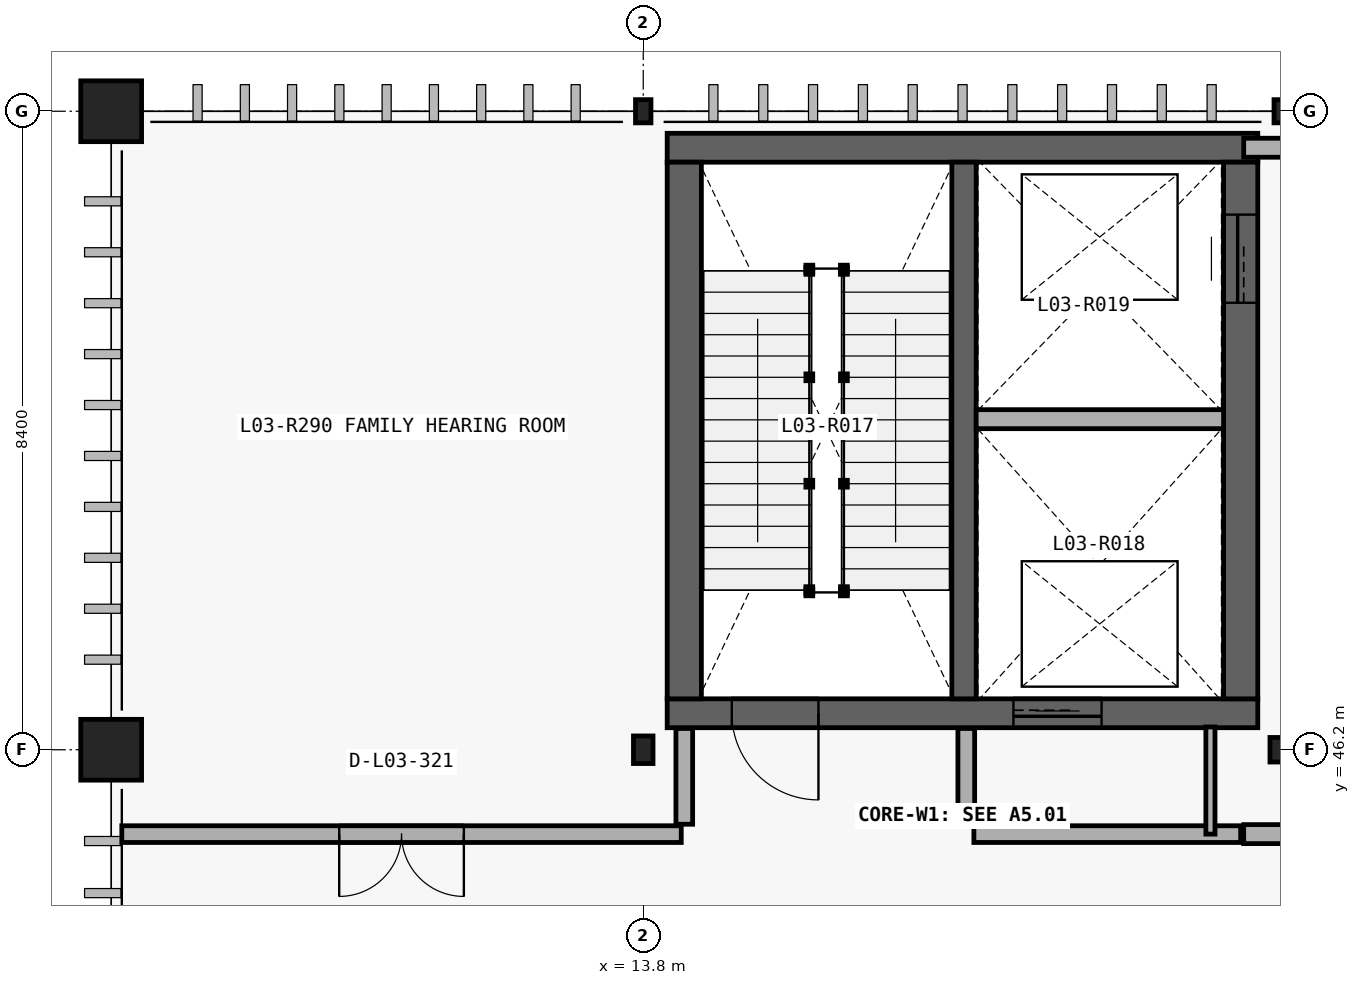
"""IFC4 building model, lengths in metres.
Left out: names, types, materials, properties, quantities, classifications, styles, units other than length and angle.
Written with IfcOpenShell. Run it as: python <this file> out.ifc"""

import sys

from ifc_helpers import new_model, si_unit, direction, frame, frame_2d, origin_with_axes, origin_2d_with_axis, place, context, subcontext, project, spatial, rectangle, hollow_rectangle, circle, i_section, extrude, element, fill, save


model = new_model("IFC4")
c1 = context("Model", 3, precision=1e-05, world=origin_with_axes(), true_north=direction((0.0, 1.0)))
c2 = subcontext(c1, "Body", "Model", "MODEL_VIEW")
j1 = project(units=[si_unit("LENGTHUNIT", "METRE"), si_unit("PLANEANGLEUNIT", "RADIAN")], contexts=[c1])
p1 = place(None, origin_with_axes())
s1 = spatial("IfcSite", under=j1, at=p1, CompositionType="ELEMENT")
p2 = place(p1, origin_with_axes())
s2 = spatial("IfcBuilding", under=s1, at=p2, CompositionType="ELEMENT")
p3 = place(p2, frame((0.0, 0.0, 15.6), z_axis=(0.0, 0.0, 1.0), x_axis=(1.0, 0.0, 0.0)))
s3 = spatial("IfcBuildingStorey", under=s2, at=p3, CompositionType="ELEMENT", Elevation=15.6)
p4 = place(None, frame((14.115, 46.68, 15.6), z_axis=(0.0, 0.0, 1.0), x_axis=(1.0, 0.0, 0.0)))
e1 = element("IfcWall", 1, at=p4, inside=s3, PredefinedType="SHEAR", context=c2, shape_type="SweptSolid", body=[
    extrude(rectangle(XDim=7.77, YDim=0.38, at=frame_2d((3.885, 0.0), x_axis=(1.0, 0.0))), origin_with_axes(), (0.0, 0.0, 1.0), 4.8),
])
p5 = place(None, frame((15.535, 46.68, 15.6), z_axis=(0.0, 0.0, 1.0), x_axis=(1.0, 0.0, 0.0)))
e2 = element("IfcOpeningElement", 2, at=p5, cuts=e1, PredefinedType="OPENING", context=c2, shape_type="SweptSolid", body=[
    extrude(rectangle(XDim=1.14, YDim=2.18, at=frame_2d((0.0, 1.09), x_axis=(1.0, 0.0))), frame((0.0, 0.2, 0.0), z_axis=(0.0, -1.0, 0.0), x_axis=(1.0, 0.0, 0.0)), (0.0, 0.0, 1.0), 0.4),
])
p6 = place(None, frame((19.25, 46.68, 15.6), z_axis=(0.0, 0.0, 1.0), x_axis=(1.0, 0.0, 0.0)))
e3 = element("IfcOpeningElement", 3, at=p6, cuts=e1, PredefinedType="OPENING", context=c2, shape_type="SweptSolid", body=[
    extrude(rectangle(XDim=1.16, YDim=2.2, at=frame_2d((0.0, 1.1), x_axis=(1.0, 0.0))), frame((0.0, 0.2, 0.0), z_axis=(0.0, -1.0, 0.0), x_axis=(1.0, 0.0, 0.0)), (0.0, 0.0, 1.0), 0.4),
])
p7 = place(None, frame((21.885, 54.12, 15.6), z_axis=(0.0, 0.0, 1.0), x_axis=(-1.0, 0.0, 0.0)))
e4 = element("IfcWall", 4, at=p7, inside=s3, PredefinedType="SHEAR", context=c2, shape_type="SweptSolid", body=[
    extrude(rectangle(XDim=7.77, YDim=0.38, at=frame_2d((3.885, 0.0), x_axis=(1.0, 0.0))), origin_with_axes(), (0.0, 0.0, 1.0), 4.8),
])
p8 = place(None, frame((21.66, 46.87, 15.6), z_axis=(0.0, 0.0, 1.0), x_axis=(0.0, 1.0, 0.0)))
e5 = element("IfcWall", 5, at=p8, inside=s3, PredefinedType="SHEAR", context=c2, shape_type="SweptSolid", body=[
    extrude(rectangle(XDim=7.06, YDim=0.45, at=frame_2d((3.53, 0.0), x_axis=(1.0, 0.0))), origin_with_axes(), (0.0, 0.0, 1.0), 4.8),
])
p9 = place(None, frame((21.66, 52.66, 15.6), z_axis=(0.0, 0.0, 1.0), x_axis=(0.0, 1.0, 0.0)))
e6 = element("IfcOpeningElement", 6, at=p9, cuts=e5, PredefinedType="OPENING", context=c2, shape_type="SweptSolid", body=[
    extrude(rectangle(XDim=1.16, YDim=2.2, at=frame_2d((0.0, 1.1), x_axis=(1.0, 0.0))), frame((0.0, 0.235, 0.0), z_axis=(0.0, -1.0, 0.0), x_axis=(1.0, 0.0, 0.0)), (0.0, 0.0, 1.0), 0.47),
])
p10 = place(None, frame((14.34, 53.93, 15.6), z_axis=(0.0, 0.0, 1.0), x_axis=(0.0, -1.0, 0.0)))
e7 = element("IfcWall", 7, at=p10, inside=s3, PredefinedType="SHEAR", context=c2, shape_type="SweptSolid", body=[
    extrude(rectangle(XDim=7.06, YDim=0.45, at=frame_2d((3.53, 0.0), x_axis=(1.0, 0.0))), origin_with_axes(), (0.0, 0.0, 1.0), 4.8),
])
p11 = place(None, frame((18.02, 46.87, 15.6), z_axis=(0.0, 0.0, 1.0), x_axis=(0.0, 1.0, 0.0)))
e8 = element("IfcWall", 8, at=p11, inside=s3, PredefinedType="SHEAR", context=c2, shape_type="SweptSolid", body=[
    extrude(rectangle(XDim=7.06, YDim=0.32, at=frame_2d((3.53, 0.0), x_axis=(1.0, 0.0))), origin_with_axes(), (0.0, 0.0, 1.0), 4.8),
])
p12 = place(None, frame((18.18, 50.549, 15.6), z_axis=(0.0, 0.0, 1.0), x_axis=(1.0, 0.0, 0.0)))
e9 = element("IfcWall", 9, at=p12, inside=s3, PredefinedType="PARTITIONING", context=c2, shape_type="SweptSolid", body=[
    extrude(rectangle(XDim=3.255, YDim=0.25, at=frame_2d((1.627, 0.0), x_axis=(1.0, 0.0))), origin_with_axes(), (0.0, 0.0, 1.0), 4.48),
])
p13 = place(None, frame((21.7, 54.12, 15.6), z_axis=(0.0, 0.0, 1.0), x_axis=(1.0, 0.0, 0.0)))
e10 = element("IfcWall", 10, at=p13, inside=s3, PredefinedType="PARTITIONING", context=c2, shape_type="SweptSolid", body=[
    extrude(rectangle(XDim=3.36, YDim=0.25, at=frame_2d((1.68, 0.0), x_axis=(1.0, 0.0))), origin_with_axes(), (0.0, 0.0, 1.0), 4.48),
])
p14 = place(None, frame((21.7, 45.09, 15.6), z_axis=(0.0, 0.0, 1.0), x_axis=(1.0, 0.0, 0.0)))
e11 = element("IfcWall", 11, at=p14, inside=s3, PredefinedType="PARTITIONING", context=c2, shape_type="SweptSolid", body=[
    extrude(rectangle(XDim=3.36, YDim=0.25, at=frame_2d((1.68, 0.0), x_axis=(1.0, 0.0))), origin_with_axes(), (0.0, 0.0, 1.0), 4.48),
])
p15 = place(None, frame((24.005, 45.09, 15.6), z_axis=(0.0, 0.0, 1.0), x_axis=(1.0, 0.0, 0.0)))
e12 = element("IfcOpeningElement", 12, at=p15, cuts=e11, PredefinedType="OPENING", context=c2, shape_type="SweptSolid", body=[
    extrude(rectangle(XDim=0.91, YDim=2.12, at=frame_2d((0.0, 1.06), x_axis=(1.0, 0.0))), frame((0.0, 0.135, 0.0), z_axis=(0.0, -1.0, 0.0), x_axis=(1.0, 0.0, 0.0)), (0.0, 0.0, 1.0), 0.27),
])
for number, where, z_axis, x_axis in (
    (13, (14.34, 45.22, 15.6), (0.0, 0.0, 1.0), (0.0, 1.0, 0.0)),
    (14, (18.05, 45.22, 15.6), (0.0, 0.0, 1.0), (0.0, 1.0, 0.0)),
):
    element("IfcWall", number, at=place(None, frame(where, z_axis=z_axis, x_axis=x_axis)), inside=s3, PredefinedType="PARTITIONING", context=c2, shape_type="SweptSolid", body=[
        extrude(rectangle(XDim=1.26, YDim=0.22, at=frame_2d((0.63, 0.0), x_axis=(1.0, 0.0))), origin_with_axes(), (0.0, 0.0, 1.0), 4.48),
    ])
p16 = place(None, frame((6.94, 45.09, 15.6), z_axis=(0.0, 0.0, 1.0), x_axis=(1.0, 0.0, 0.0)))
e15 = element("IfcWall", 15, at=p16, inside=s3, PredefinedType="PARTITIONING", context=c2, shape_type="SweptSolid", body=[
    extrude(rectangle(XDim=7.36, YDim=0.22, at=frame_2d((3.68, 0.0), x_axis=(1.0, 0.0))), origin_with_axes(), (0.0, 0.0, 1.0), 4.48),
])
p17 = place(None, frame((10.62, 45.09, 15.6), z_axis=(0.0, 0.0, 1.0), x_axis=(1.0, 0.0, 0.0)))
e16 = element("IfcOpeningElement", 16, at=p17, cuts=e15, PredefinedType="OPENING", context=c2, shape_type="SweptSolid", body=[
    extrude(rectangle(XDim=1.64, YDim=2.42, at=frame_2d((0.0, 1.21), x_axis=(1.0, 0.0))), frame((0.0, 0.12, 0.0), z_axis=(0.0, -1.0, 0.0), x_axis=(1.0, 0.0, 0.0)), (0.0, 0.0, 1.0), 0.24),
])
p18 = place(None, frame((18.15, 45.09, 15.6), z_axis=(0.0, 0.0, 1.0), x_axis=(1.0, 0.0, 0.0)))
e17 = element("IfcWall", 17, at=p18, inside=s3, PredefinedType="PARTITIONING", context=c2, shape_type="SweptSolid", body=[
    extrude(rectangle(XDim=3.51, YDim=0.22, at=frame_2d((1.755, 0.0), x_axis=(1.0, 0.0))), origin_with_axes(), (0.0, 0.0, 1.0), 4.48),
])
p19 = place(None, frame((21.262, 45.09, 15.6), z_axis=(0.0, 0.0, 1.0), x_axis=(0.0, 1.0, 0.0)))
e18 = element("IfcWall", 18, at=p19, inside=s3, PredefinedType="PARTITIONING", context=c2, shape_type="SweptSolid", body=[
    extrude(rectangle(XDim=1.41, YDim=0.12, at=frame_2d((0.705, 0.0), x_axis=(1.0, 0.0))), origin_with_axes(), (0.0, 0.0, 1.0), 4.48),
])
for number, where, z_axis, x_axis in (
    (19, (6.8, 46.2, 15.6), (0.0, 0.0, 1.0), (1.0, 0.0, 0.0)),
    (20, (6.8, 54.6, 15.6), (0.0, 0.0, 1.0), (1.0, 0.0, 0.0)),
):
    element("IfcColumn", number, at=place(None, frame(where, z_axis=z_axis, x_axis=x_axis)), inside=s3, PredefinedType="COLUMN", context=c2, shape_type="SweptSolid", body=[
        extrude(circle(Radius=0.4, at=origin_2d_with_axis()), origin_with_axes(), (0.0, 0.0, 1.0), 4.8),
    ])
p20 = place(None, frame((13.8, 46.2, 15.6), z_axis=(0.0, 0.0, 1.0), x_axis=(1.0, 0.0, 0.0)))
e21 = element("IfcColumn", 21, at=p20, inside=s3, PredefinedType="COLUMN", context=c2, shape_type="SweptSolid", body=[
    extrude(i_section(OverallWidth=0.257, OverallDepth=0.363, WebThickness=0.013, FlangeThickness=0.022, at=origin_2d_with_axis()), origin_with_axes(), (0.0, 0.0, 1.0), 4.8),
])
p21 = place(None, frame((13.8, 54.6, 15.6), z_axis=(0.0, 0.0, 1.0), x_axis=(1.0, 0.0, 0.0)))
e22 = element("IfcColumn", 22, at=p21, inside=s3, PredefinedType="COLUMN", context=c2, shape_type="SweptSolid", body=[
    extrude(hollow_rectangle(XDim=0.203, YDim=0.305, WallThickness=0.013, InnerFilletRadius=0.025, OuterFilletRadius=0.013, at=origin_2d_with_axis()), origin_with_axes(), (0.0, 0.0, 1.0), 4.8),
])
p22 = place(None, frame((22.2, 46.2, 15.6), z_axis=(0.0, 0.0, 1.0), x_axis=(1.0, 0.0, 0.0)))
e23 = element("IfcColumn", 23, at=p22, inside=s3, PredefinedType="COLUMN", context=c2, shape_type="SweptSolid", body=[
    extrude(i_section(OverallWidth=0.309, OverallDepth=0.323, WebThickness=0.014, FlangeThickness=0.023, at=origin_2d_with_axis()), origin_with_axes(), (0.0, 0.0, 1.0), 4.8),
])
p23 = place(None, frame((22.2, 54.6, 15.6), z_axis=(0.0, 0.0, 1.0), x_axis=(1.0, 0.0, 0.0)))
e24 = element("IfcColumn", 24, at=p23, inside=s3, PredefinedType="COLUMN", context=c2, shape_type="SweptSolid", body=[
    extrude(hollow_rectangle(XDim=0.203, YDim=0.305, WallThickness=0.013, InnerFilletRadius=0.025, OuterFilletRadius=0.013, at=origin_2d_with_axis()), origin_with_axes(), (0.0, 0.0, 1.0), 4.8),
])
p24 = place(None, frame((15.535, 46.68, 15.6), z_axis=(0.0, 0.0, 1.0), x_axis=(-1.0, 0.0, 0.0)))
e25 = element("IfcDoor", 25, at=p24, inside=s3, OperationType="SINGLE_SWING_RIGHT", PredefinedType="DOOR", context=c2, shape_type="SweptSolid", body=[
    extrude(rectangle(XDim=1.14, YDim=2.18, at=frame_2d((0.0, 1.09), x_axis=(1.0, 0.0))), frame((0.0, 0.04, 0.0), z_axis=(0.0, -1.0, 0.0), x_axis=(1.0, 0.0, 0.0)), (0.0, 0.0, 1.0), 0.08),
])
fill(e2, e25)
p25 = place(None, frame((19.25, 46.68, 15.6), z_axis=(0.0, 0.0, 1.0), x_axis=(-1.0, 0.0, 0.0)))
e26 = element("IfcDoor", 26, at=p25, inside=s3, OperationType="SLIDING_TO_LEFT", PredefinedType="DOOR", context=c2, shape_type="SweptSolid", body=[
    extrude(rectangle(XDim=1.16, YDim=2.2, at=frame_2d((0.0, 1.1), x_axis=(1.0, 0.0))), frame((0.0, 0.04, 0.0), z_axis=(0.0, -1.0, 0.0), x_axis=(1.0, 0.0, 0.0)), (0.0, 0.0, 1.0), 0.08),
])
fill(e3, e26)
p26 = place(None, frame((21.66, 52.66, 15.6), z_axis=(0.0, 0.0, 1.0), x_axis=(0.0, 1.0, 0.0)))
e27 = element("IfcDoor", 27, at=p26, inside=s3, OperationType="SLIDING_TO_LEFT", PredefinedType="DOOR", context=c2, shape_type="SweptSolid", body=[
    extrude(rectangle(XDim=1.16, YDim=2.2, at=frame_2d((0.0, 1.1), x_axis=(1.0, 0.0))), frame((0.0, 0.04, 0.0), z_axis=(0.0, -1.0, 0.0), x_axis=(1.0, 0.0, 0.0)), (0.0, 0.0, 1.0), 0.08),
])
fill(e6, e27)
p27 = place(None, frame((10.62, 45.09, 15.6), z_axis=(0.0, 0.0, 1.0), x_axis=(-1.0, 0.0, 0.0)))
e28 = element("IfcDoor", 28, at=p27, inside=s3, OperationType="DOUBLE_DOOR_SINGLE_SWING", PredefinedType="DOOR", context=c2, shape_type="SweptSolid", body=[
    extrude(rectangle(XDim=1.64, YDim=2.42, at=frame_2d((0.0, 1.21), x_axis=(1.0, 0.0))), frame((0.0, 0.04, 0.0), z_axis=(0.0, -1.0, 0.0), x_axis=(1.0, 0.0, 0.0)), (0.0, 0.0, 1.0), 0.08),
])
fill(e16, e28)
save(model, sys.argv[1])
